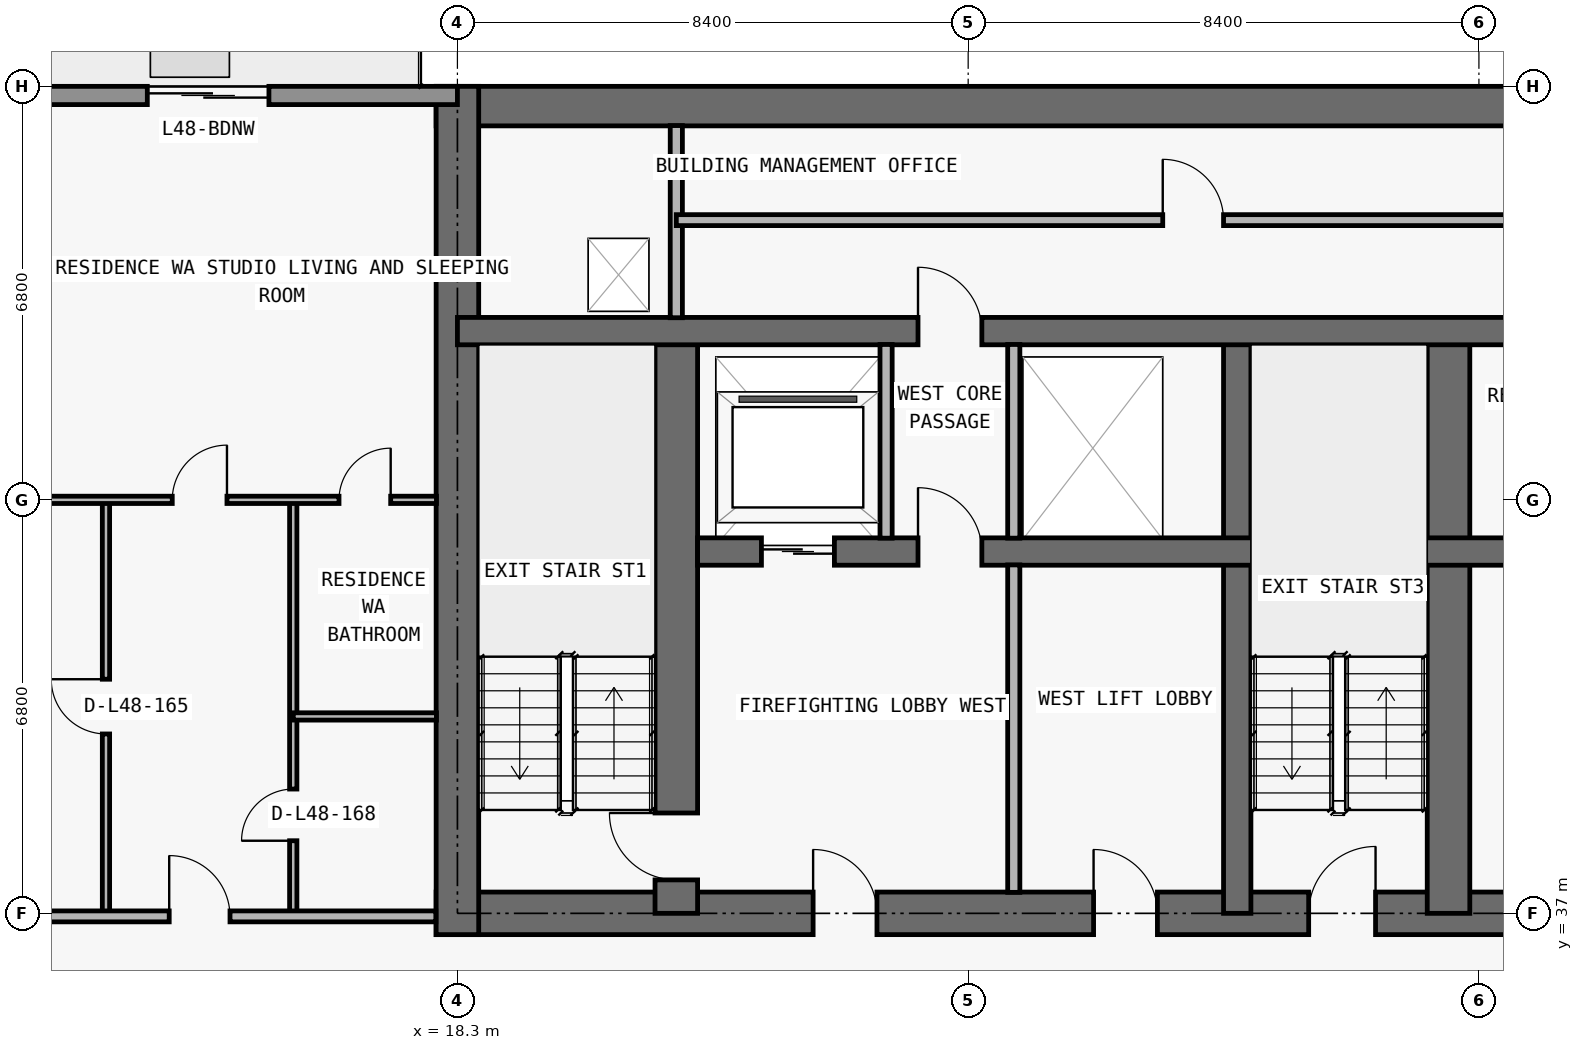
"""IFC4 building model, lengths in metres.
Left out: names, types, materials, properties, quantities, classifications, styles, units other than length and angle.
Written with IfcOpenShell. Run it as: python <this file> out.ifc"""

import sys

from ifc_helpers import new_model, si_unit, direction, frame, frame_2d, origin, place, context, subcontext, project, spatial, rectangle, extrude, element, fill, save


model = new_model("IFC4")
c1 = context("Model", 3, precision=1e-05, world=origin(), true_north=direction((0.0, 1.0)))
c2 = subcontext(c1, "Body", "Model", "MODEL_VIEW")
j1 = project(units=[si_unit("LENGTHUNIT", "METRE"), si_unit("PLANEANGLEUNIT", "RADIAN")], contexts=[c1])
p1 = place(None, origin())
s1 = spatial("IfcSite", under=j1, at=p1, CompositionType="ELEMENT")
p2 = place(p1, origin())
s2 = spatial("IfcBuilding", under=s1, at=p2, CompositionType="ELEMENT")
p3 = place(p2, frame((0.0, 0.0, 173.7)))
s3 = spatial("IfcBuildingStorey", under=s2, at=p3, CompositionType="ELEMENT", Elevation=173.7)
p4 = place(p3, frame((17.95, 37.0, 0.0), z_axis=(0.0, 0.0, 1.0), x_axis=(1.0, 0.0, 0.0)))
e1 = element("IfcWall", 1, at=p4, inside=s3, PredefinedType="SHEAR", context=c2, shape_type="SweptSolid", body=[
    extrude(rectangle(XDim=41.9, YDim=0.7, at=frame_2d((20.95, 0.0))), origin(), (0.0, 0.0, 1.0), 3.05),
])
p5 = place(p4, frame((14.35, 0.0, 0.0)))
e2 = element("IfcOpeningElement", 2, at=p5, cuts=e1, PredefinedType="OPENING", context=c2, shape_type="SweptSolid", body=[
    extrude(rectangle(XDim=1.1, YDim=2.15, at=frame_2d((0.55, 1.075))), frame((0.0, 0.36, 0.0), z_axis=(0.0, -1.0, 0.0), x_axis=(1.0, 0.0, 0.0)), (0.0, 0.0, 1.0), 0.72),
])
p6 = place(p4, frame((6.2, 0.0, 0.0)))
e3 = element("IfcOpeningElement", 3, at=p6, cuts=e1, PredefinedType="OPENING", context=c2, shape_type="SweptSolid", body=[
    extrude(rectangle(XDim=1.05, YDim=2.15, at=frame_2d((0.525, 1.075))), frame((0.0, 0.36, 0.0), z_axis=(0.0, -1.0, 0.0), x_axis=(1.0, 0.0, 0.0)), (0.0, 0.0, 1.0), 0.72),
])
p7 = place(p4, frame((34.7, 0.0, 0.0)))
e4 = element("IfcOpeningElement", 4, at=p7, cuts=e1, PredefinedType="OPENING", context=c2, shape_type="SweptSolid", body=[
    extrude(rectangle(XDim=1.05, YDim=2.15, at=frame_2d((0.525, 1.075))), frame((0.0, 0.36, 0.0), z_axis=(0.0, -1.0, 0.0), x_axis=(1.0, 0.0, 0.0)), (0.0, 0.0, 1.0), 0.72),
])
p8 = place(p4, frame((10.812, 0.0, 0.0)))
e5 = element("IfcOpeningElement", 5, at=p8, cuts=e1, PredefinedType="OPENING", context=c2, shape_type="SweptSolid", body=[
    extrude(rectangle(XDim=1.05, YDim=2.15, at=frame_2d((0.525, 1.075))), frame((0.0, 0.36, 0.0), z_axis=(0.0, -1.0, 0.0), x_axis=(1.0, 0.0, 0.0)), (0.0, 0.0, 1.0), 0.72),
])
p9 = place(p4, frame((24.05, 0.0, 0.0)))
e6 = element("IfcOpeningElement", 6, at=p9, cuts=e1, PredefinedType="OPENING", context=c2, shape_type="SweptSolid", body=[
    extrude(rectangle(XDim=1.05, YDim=2.15, at=frame_2d((0.525, 1.075))), frame((0.0, 0.36, 0.0), z_axis=(0.0, -1.0, 0.0), x_axis=(1.0, 0.0, 0.0)), (0.0, 0.0, 1.0), 0.72),
])
p10 = place(p3, frame((17.95, 50.275, 0.0), z_axis=(0.0, 0.0, 1.0), x_axis=(1.0, 0.0, 0.0)))
e7 = element("IfcWall", 7, at=p10, inside=s3, PredefinedType="SHEAR", context=c2, shape_type="SweptSolid", body=[
    extrude(rectangle(XDim=41.9, YDim=0.65, at=frame_2d((20.95, 0.0))), origin(), (0.0, 0.0, 1.0), 3.05),
])
p11 = place(p3, frame((18.3, 36.65, 0.0), z_axis=(0.0, 0.0, 1.0), x_axis=(0.0, 1.0, 0.0)))
e8 = element("IfcWall", 8, at=p11, inside=s3, PredefinedType="SHEAR", context=c2, shape_type="SweptSolid", body=[
    extrude(rectangle(XDim=13.95, YDim=0.7, at=frame_2d((6.975, 0.0))), origin(), (0.0, 0.0, 1.0), 3.05),
])
p12 = place(p3, frame((21.9, 37.0, 0.0), z_axis=(0.0, 0.0, 1.0), x_axis=(0.0, 1.0, 0.0)))
e9 = element("IfcWall", 9, at=p12, inside=s3, PredefinedType="SHEAR", context=c2, shape_type="SweptSolid", body=[
    extrude(rectangle(XDim=9.575, YDim=0.7, at=frame_2d((4.788, 0.0))), origin(), (0.0, 0.0, 1.0), 3.05),
])
p13 = place(p12, frame((0.55, 0.0, 0.0)))
e10 = element("IfcOpeningElement", 10, at=p13, cuts=e9, PredefinedType="OPENING", context=c2, shape_type="SweptSolid", body=[
    extrude(rectangle(XDim=1.1, YDim=2.15, at=frame_2d((0.55, 1.075))), frame((0.0, 0.36, 0.0), z_axis=(0.0, -1.0, 0.0), x_axis=(1.0, 0.0, 0.0)), (0.0, 0.0, 1.0), 0.72),
])
p14 = place(p3, frame((31.125, 37.0, 0.0), z_axis=(0.0, 0.0, 1.0), x_axis=(0.0, 1.0, 0.0)))
e11 = element("IfcWall", 11, at=p14, inside=s3, PredefinedType="SHEAR", context=c2, shape_type="SweptSolid", body=[
    extrude(rectangle(XDim=9.575, YDim=0.45, at=frame_2d((4.788, 0.0))), origin(), (0.0, 0.0, 1.0), 3.05),
])
p15 = place(p3, frame((34.6, 37.0, 0.0), z_axis=(0.0, 0.0, 1.0), x_axis=(0.0, 1.0, 0.0)))
e12 = element("IfcWall", 12, at=p15, inside=s3, PredefinedType="SHEAR", context=c2, shape_type="SweptSolid", body=[
    extrude(rectangle(XDim=9.575, YDim=0.7, at=frame_2d((4.788, 0.0))), origin(), (0.0, 0.0, 1.0), 3.05),
])
p16 = place(p3, frame((22.25, 42.95, 0.0), z_axis=(0.0, 0.0, 1.0), x_axis=(1.0, 0.0, 0.0)))
e13 = element("IfcWall", 13, at=p16, inside=s3, PredefinedType="SHEAR", context=c2, shape_type="SweptSolid", body=[
    extrude(rectangle(XDim=33.3, YDim=0.45, at=frame_2d((16.65, 0.0))), origin(), (0.0, 0.0, 1.0), 3.05),
])
p17 = place(p16, frame((1.05, 0.0, 0.0)))
e14 = element("IfcOpeningElement", 14, at=p17, cuts=e13, PredefinedType="OPENING", context=c2, shape_type="SweptSolid", body=[
    extrude(rectangle(XDim=1.2, YDim=2.2, at=frame_2d((0.6, 1.1))), frame((0.0, 0.235, 0.0), z_axis=(0.0, -1.0, 0.0), x_axis=(1.0, 0.0, 0.0)), (0.0, 0.0, 1.0), 0.47),
])
p18 = place(p16, frame((31.05, 0.0, 0.0)))
e15 = element("IfcOpeningElement", 15, at=p18, cuts=e13, PredefinedType="OPENING", context=c2, shape_type="SweptSolid", body=[
    extrude(rectangle(XDim=1.2, YDim=2.2, at=frame_2d((0.6, 1.1))), frame((0.0, 0.235, 0.0), z_axis=(0.0, -1.0, 0.0), x_axis=(1.0, 0.0, 0.0)), (0.0, 0.0, 1.0), 0.47),
])
p19 = place(p16, frame((21.4, 0.0, 0.0)))
e16 = element("IfcOpeningElement", 16, at=p19, cuts=e13, PredefinedType="OPENING", context=c2, shape_type="SweptSolid", body=[
    extrude(rectangle(XDim=1.1, YDim=2.2, at=frame_2d((0.55, 1.1))), frame((0.0, 0.235, 0.0), z_axis=(0.0, -1.0, 0.0), x_axis=(1.0, 0.0, 0.0)), (0.0, 0.0, 1.0), 0.47),
])
p20 = place(p16, frame((24.0, 0.0, 0.0)))
e17 = element("IfcOpeningElement", 17, at=p20, cuts=e13, PredefinedType="OPENING", context=c2, shape_type="SweptSolid", body=[
    extrude(rectangle(XDim=1.1, YDim=2.2, at=frame_2d((0.55, 1.1))), frame((0.0, 0.235, 0.0), z_axis=(0.0, -1.0, 0.0), x_axis=(1.0, 0.0, 0.0)), (0.0, 0.0, 1.0), 0.47),
])
p21 = place(p16, frame((3.625, 0.0, 0.0)))
e18 = element("IfcOpeningElement", 18, at=p21, cuts=e13, PredefinedType="OPENING", context=c2, shape_type="SweptSolid", body=[
    extrude(rectangle(XDim=1.05, YDim=2.15, at=frame_2d((0.525, 1.075))), frame((0.0, 0.235, 0.0), z_axis=(0.0, -1.0, 0.0), x_axis=(1.0, 0.0, 0.0)), (0.0, 0.0, 1.0), 0.47),
])
p22 = place(p16, frame((28.675, 0.0, 0.0)))
e19 = element("IfcOpeningElement", 19, at=p22, cuts=e13, PredefinedType="OPENING", context=c2, shape_type="SweptSolid", body=[
    extrude(rectangle(XDim=1.05, YDim=2.15, at=frame_2d((0.525, 1.075))), frame((0.0, 0.235, 0.0), z_axis=(0.0, -1.0, 0.0), x_axis=(1.0, 0.0, 0.0)), (0.0, 0.0, 1.0), 0.47),
])
p23 = place(p16, frame((13.925, 0.0, 0.0)))
e20 = element("IfcOpeningElement", 20, at=p23, cuts=e13, PredefinedType="OPENING", context=c2, shape_type="SweptSolid", body=[
    extrude(rectangle(XDim=1.0, YDim=2.2, at=frame_2d((0.5, 1.1))), frame((0.0, 0.235, 0.0), z_axis=(0.0, -1.0, 0.0), x_axis=(1.0, 0.0, 0.0)), (0.0, 0.0, 1.0), 0.47),
])
p24 = place(p16, frame((18.05, 0.0, 0.0)))
e21 = element("IfcOpeningElement", 21, at=p24, cuts=e13, PredefinedType="OPENING", context=c2, shape_type="SweptSolid", body=[
    extrude(rectangle(XDim=1.0, YDim=2.2, at=frame_2d((0.5, 1.1))), frame((0.0, 0.235, 0.0), z_axis=(0.0, -1.0, 0.0), x_axis=(1.0, 0.0, 0.0)), (0.0, 0.0, 1.0), 0.47),
])
p25 = place(p3, frame((18.3, 46.575, 0.0), z_axis=(0.0, 0.0, 1.0), x_axis=(1.0, 0.0, 0.0)))
e22 = element("IfcWall", 22, at=p25, inside=s3, PredefinedType="SHEAR", context=c2, shape_type="SweptSolid", body=[
    extrude(rectangle(XDim=41.2, YDim=0.45, at=frame_2d((20.6, 0.0))), origin(), (0.0, 0.0, 1.0), 3.05),
])
p26 = place(p25, frame((7.575, 0.0, 0.0)))
e23 = element("IfcOpeningElement", 23, at=p26, cuts=e22, PredefinedType="OPENING", context=c2, shape_type="SweptSolid", body=[
    extrude(rectangle(XDim=1.05, YDim=2.15, at=frame_2d((0.525, 1.075))), frame((0.0, 0.235, 0.0), z_axis=(0.0, -1.0, 0.0), x_axis=(1.0, 0.0, 0.0)), (0.0, 0.0, 1.0), 0.47),
])
p27 = place(p25, frame((32.625, 0.0, 0.0)))
e24 = element("IfcOpeningElement", 24, at=p27, cuts=e22, PredefinedType="OPENING", context=c2, shape_type="SweptSolid", body=[
    extrude(rectangle(XDim=1.05, YDim=2.15, at=frame_2d((0.525, 1.075))), frame((0.0, 0.235, 0.0), z_axis=(0.0, -1.0, 0.0), x_axis=(1.0, 0.0, 0.0)), (0.0, 0.0, 1.0), 0.47),
])
p28 = place(p3, frame((10.1, 50.45, 0.0), z_axis=(0.0, 0.0, 1.0), x_axis=(1.0, 0.0, 0.0)))
e25 = element("IfcWall", 25, at=p28, inside=s3, PredefinedType="STANDARD", context=c2, shape_type="SweptSolid", body=[
    extrude(rectangle(XDim=8.2, YDim=0.3, at=frame_2d((4.1, 0.0))), origin(), (0.0, 0.0, 1.0), 3.05),
])
p29 = place(p28, frame((3.1, 0.0, 0.0)))
e26 = element("IfcOpeningElement", 26, at=p29, cuts=e25, PredefinedType="OPENING", context=c2, shape_type="SweptSolid", body=[
    extrude(rectangle(XDim=2.0, YDim=2.3, at=frame_2d((1.0, 1.15))), frame((0.0, 0.16, 0.0), z_axis=(0.0, -1.0, 0.0), x_axis=(1.0, 0.0, 0.0)), (0.0, 0.0, 1.0), 0.32),
])
p30 = place(p3, frame((12.52, 37.0, 0.0), z_axis=(0.0, 0.0, 1.0), x_axis=(0.0, 1.0, 0.0)))
e27 = element("IfcWall", 27, at=p30, inside=s3, PredefinedType="PARTITIONING", context=c2, shape_type="SweptSolid", body=[
    extrude(rectangle(XDim=6.8, YDim=0.12, at=frame_2d((3.4, 0.0))), origin(), (0.0, 0.0, 1.0), 2.578),
])
p31 = place(p30, frame((2.95, 0.0, 0.0)))
e28 = element("IfcOpeningElement", 28, at=p31, cuts=e27, PredefinedType="OPENING", context=c2, shape_type="SweptSolid", body=[
    extrude(rectangle(XDim=0.9, YDim=2.15, at=frame_2d((0.45, 1.075))), frame((0.0, 0.07, 0.0), z_axis=(0.0, -1.0, 0.0), x_axis=(1.0, 0.0, 0.0)), (0.0, 0.0, 1.0), 0.14),
])
p32 = place(p3, frame((15.6, 37.0, 0.0), z_axis=(0.0, 0.0, 1.0), x_axis=(0.0, 1.0, 0.0)))
e29 = element("IfcWall", 29, at=p32, inside=s3, PredefinedType="PARTITIONING", context=c2, shape_type="SweptSolid", body=[
    extrude(rectangle(XDim=6.8, YDim=0.12, at=frame_2d((3.4, 0.0))), origin(), (0.0, 0.0, 1.0), 2.679),
])
p33 = place(p32, frame((1.194, 0.0, 0.0)))
e30 = element("IfcOpeningElement", 30, at=p33, cuts=e29, PredefinedType="OPENING", context=c2, shape_type="SweptSolid", body=[
    extrude(rectangle(XDim=0.85, YDim=2.1, at=frame_2d((0.425, 1.05))), frame((0.0, 0.07, 0.0), z_axis=(0.0, -1.0, 0.0), x_axis=(1.0, 0.0, 0.0)), (0.0, 0.0, 1.0), 0.14),
])
p34 = place(p3, frame((21.9, 46.795, 0.0), z_axis=(0.0, 0.0, 1.0), x_axis=(0.0, 1.0, 0.0)))
e31 = element("IfcWall", 31, at=p34, inside=s3, PredefinedType="PARTITIONING", context=c2, shape_type="SweptSolid", body=[
    extrude(rectangle(XDim=3.16, YDim=0.2, at=frame_2d((1.58, 0.0))), origin(), (0.0, 0.0, 1.0), 3.05),
])
p35 = place(p3, frame((25.35, 43.17, 0.0), z_axis=(0.0, 0.0, 1.0), x_axis=(0.0, 1.0, 0.0)))
e32 = element("IfcWall", 32, at=p35, inside=s3, PredefinedType="PARTITIONING", context=c2, shape_type="SweptSolid", body=[
    extrude(rectangle(XDim=3.185, YDim=0.2, at=frame_2d((1.593, 0.0))), origin(), (0.0, 0.0, 1.0), 3.05),
])
p36 = place(p3, frame((27.45, 37.345, 0.0), z_axis=(0.0, 0.0, 1.0), x_axis=(0.0, 1.0, 0.0)))
e33 = element("IfcWall", 33, at=p36, inside=s3, PredefinedType="PARTITIONING", context=c2, shape_type="SweptSolid", body=[
    extrude(rectangle(XDim=5.385, YDim=0.2, at=frame_2d((2.692, 0.0))), origin(), (0.0, 0.0, 1.0), 3.05),
])
p37 = place(p3, frame((27.45, 43.17, 0.0), z_axis=(0.0, 0.0, 1.0), x_axis=(0.0, 1.0, 0.0)))
e34 = element("IfcWall", 34, at=p37, inside=s3, PredefinedType="PARTITIONING", context=c2, shape_type="SweptSolid", body=[
    extrude(rectangle(XDim=3.185, YDim=0.2, at=frame_2d((1.593, 0.0))), origin(), (0.0, 0.0, 1.0), 3.05),
])
p38 = place(p3, frame((10.1, 36.95, 0.0), z_axis=(0.0, 0.0, 1.0), x_axis=(1.0, 0.0, 0.0)))
e35 = element("IfcWall", 35, at=p38, inside=s3, PredefinedType="PARTITIONING", context=c2, shape_type="SweptSolid", body=[
    extrude(rectangle(XDim=7.845, YDim=0.18, at=frame_2d((3.922, 0.0))), origin(), (0.0, 0.0, 1.0), 3.05),
])
p39 = place(p38, frame((3.46, 0.0, 0.0)))
e36 = element("IfcOpeningElement", 36, at=p39, cuts=e35, PredefinedType="OPENING", context=c2, shape_type="SweptSolid", body=[
    extrude(rectangle(XDim=1.0, YDim=2.2, at=frame_2d((0.5, 1.1))), frame((0.0, 0.1, 0.0), z_axis=(0.0, -1.0, 0.0), x_axis=(1.0, 0.0, 0.0)), (0.0, 0.0, 1.0), 0.2),
])
p40 = place(p3, frame((15.6, 40.238, 0.0), z_axis=(0.0, 0.0, 1.0), x_axis=(1.0, 0.0, 0.0)))
e37 = element("IfcWall", 37, at=p40, inside=s3, PredefinedType="PARTITIONING", context=c2, shape_type="SweptSolid", body=[
    extrude(rectangle(XDim=2.355, YDim=0.12, at=frame_2d((1.177, 0.0))), origin(), (0.0, 0.0, 1.0), 3.05),
])
p41 = place(p3, frame((6.395, 43.8, 0.0), z_axis=(0.0, 0.0, 1.0), x_axis=(1.0, 0.0, 0.0)))
e38 = element("IfcWall", 38, at=p41, inside=s3, PredefinedType="PARTITIONING", context=c2, shape_type="SweptSolid", body=[
    extrude(rectangle(XDim=11.56, YDim=0.12, at=frame_2d((5.78, 0.0))), origin(), (0.0, 0.0, 1.0), 2.418),
])
p42 = place(p41, frame((7.215, 0.0, 0.0)))
e39 = element("IfcOpeningElement", 39, at=p42, cuts=e38, PredefinedType="OPENING", context=c2, shape_type="SweptSolid", body=[
    extrude(rectangle(XDim=0.9, YDim=2.15, at=frame_2d((0.45, 1.075))), frame((0.0, 0.07, 0.0), z_axis=(0.0, -1.0, 0.0), x_axis=(1.0, 0.0, 0.0)), (0.0, 0.0, 1.0), 0.14),
])
p43 = place(p41, frame((9.958, 0.0, 0.0)))
e40 = element("IfcOpeningElement", 40, at=p43, cuts=e38, PredefinedType="OPENING", context=c2, shape_type="SweptSolid", body=[
    extrude(rectangle(XDim=0.85, YDim=2.1, at=frame_2d((0.425, 1.05))), frame((0.0, 0.07, 0.0), z_axis=(0.0, -1.0, 0.0), x_axis=(1.0, 0.0, 0.0)), (0.0, 0.0, 1.0), 0.14),
])
p44 = place(p3, frame((21.9, 48.4, 0.0), z_axis=(0.0, 0.0, 1.0), x_axis=(1.0, 0.0, 0.0)))
e41 = element("IfcWall", 41, at=p44, inside=s3, PredefinedType="PARTITIONING", context=c2, shape_type="SweptSolid", body=[
    extrude(rectangle(XDim=34.0, YDim=0.18, at=frame_2d((17.0, 0.0))), origin(), (0.0, 0.0, 1.0), 3.05),
])
p45 = place(p44, frame((8.0, 0.0, 0.0)))
e42 = element("IfcOpeningElement", 42, at=p45, cuts=e41, PredefinedType="OPENING", context=c2, shape_type="SweptSolid", body=[
    extrude(rectangle(XDim=1.0, YDim=2.2, at=frame_2d((0.5, 1.1))), frame((0.0, 0.1, 0.0), z_axis=(0.0, -1.0, 0.0), x_axis=(1.0, 0.0, 0.0)), (0.0, 0.0, 1.0), 0.2),
])
p46 = place(p44, frame((25.0, 0.0, 0.0)))
e43 = element("IfcOpeningElement", 43, at=p46, cuts=e41, PredefinedType="OPENING", context=c2, shape_type="SweptSolid", body=[
    extrude(rectangle(XDim=1.0, YDim=2.2, at=frame_2d((0.5, 1.1))), frame((0.0, 0.1, 0.0), z_axis=(0.0, -1.0, 0.0), x_axis=(1.0, 0.0, 0.0)), (0.0, 0.0, 1.0), 0.2),
])
p47 = place(p29, origin())
e44 = element("IfcDoor", 44, at=p47, inside=s3, OperationType="DOUBLE_DOOR_SLIDING", PredefinedType="DOOR", context=c2, shape_type="SweptSolid", body=[
    extrude(rectangle(XDim=2.0, YDim=2.3, at=frame_2d((1.0, 1.15))), frame((0.0, 0.025, 0.0), z_axis=(0.0, -1.0, 0.0), x_axis=(1.0, 0.0, 0.0)), (0.0, 0.0, 1.0), 0.05),
])
fill(e26, e44)
p48 = place(p17, origin())
e45 = element("IfcDoor", 45, at=p48, inside=s3, OperationType="DOUBLE_DOOR_SLIDING", PredefinedType="DOOR", context=c2, shape_type="SweptSolid", body=[
    extrude(rectangle(XDim=1.2, YDim=2.2, at=frame_2d((0.6, 1.1))), frame((0.0, 0.025, 0.0), z_axis=(0.0, -1.0, 0.0), x_axis=(1.0, 0.0, 0.0)), (0.0, 0.0, 1.0), 0.05),
])
fill(e14, e45)
p49 = place(p5, origin())
e46 = element("IfcDoor", 46, at=p49, inside=s3, OperationType="SINGLE_SWING_RIGHT", PredefinedType="DOOR", context=c2, shape_type="SweptSolid", body=[
    extrude(rectangle(XDim=1.1, YDim=2.15, at=frame_2d((0.55, 1.075))), frame((0.0, 0.025, 0.0), z_axis=(0.0, -1.0, 0.0), x_axis=(1.0, 0.0, 0.0)), (0.0, 0.0, 1.0), 0.05),
])
fill(e2, e46)
p50 = place(p6, origin())
e47 = element("IfcDoor", 47, at=p50, inside=s3, OperationType="SINGLE_SWING_LEFT", PredefinedType="DOOR", context=c2, shape_type="SweptSolid", body=[
    extrude(rectangle(XDim=1.05, YDim=2.15, at=frame_2d((0.525, 1.075))), frame((0.0, 0.025, 0.0), z_axis=(0.0, -1.0, 0.0), x_axis=(1.0, 0.0, 0.0)), (0.0, 0.0, 1.0), 0.05),
])
fill(e3, e47)
p51 = place(p13, origin())
e48 = element("IfcDoor", 48, at=p51, inside=s3, OperationType="SINGLE_SWING_RIGHT", PredefinedType="DOOR", context=c2, shape_type="SweptSolid", body=[
    extrude(rectangle(XDim=1.1, YDim=2.15, at=frame_2d((0.55, 1.075))), frame((0.0, 0.025, 0.0), z_axis=(0.0, -1.0, 0.0), x_axis=(1.0, 0.0, 0.0)), (0.0, 0.0, 1.0), 0.05),
])
fill(e10, e48)
p52 = place(p21, origin())
e49 = element("IfcDoor", 49, at=p52, inside=s3, OperationType="SINGLE_SWING_LEFT", PredefinedType="DOOR", context=c2, shape_type="SweptSolid", body=[
    extrude(rectangle(XDim=1.05, YDim=2.15, at=frame_2d((0.525, 1.075))), frame((0.0, 0.025, 0.0), z_axis=(0.0, -1.0, 0.0), x_axis=(1.0, 0.0, 0.0)), (0.0, 0.0, 1.0), 0.05),
])
fill(e18, e49)
p53 = place(p8, origin())
e50 = element("IfcDoor", 50, at=p53, inside=s3, OperationType="SINGLE_SWING_LEFT", PredefinedType="DOOR", context=c2, shape_type="SweptSolid", body=[
    extrude(rectangle(XDim=1.05, YDim=2.15, at=frame_2d((0.525, 1.075))), frame((0.0, 0.025, 0.0), z_axis=(0.0, -1.0, 0.0), x_axis=(1.0, 0.0, 0.0)), (0.0, 0.0, 1.0), 0.05),
])
fill(e5, e50)
p54 = place(p26, origin())
e51 = element("IfcDoor", 51, at=p54, inside=s3, OperationType="SINGLE_SWING_LEFT", PredefinedType="DOOR", context=c2, shape_type="SweptSolid", body=[
    extrude(rectangle(XDim=1.05, YDim=2.15, at=frame_2d((0.525, 1.075))), frame((0.0, 0.025, 0.0), z_axis=(0.0, -1.0, 0.0), x_axis=(1.0, 0.0, 0.0)), (0.0, 0.0, 1.0), 0.05),
])
fill(e23, e51)
p55 = place(p45, origin())
e52 = element("IfcDoor", 52, at=p55, inside=s3, OperationType="SINGLE_SWING_LEFT", PredefinedType="DOOR", context=c2, shape_type="SweptSolid", body=[
    extrude(rectangle(XDim=1.0, YDim=2.2, at=frame_2d((0.5, 1.1))), frame((0.0, 0.025, 0.0), z_axis=(0.0, -1.0, 0.0), x_axis=(1.0, 0.0, 0.0)), (0.0, 0.0, 1.0), 0.05),
])
fill(e42, e52)
p56 = place(p31, origin())
e53 = element("IfcDoor", 53, at=p56, inside=s3, OperationType="SINGLE_SWING_RIGHT", PredefinedType="DOOR", context=c2, shape_type="SweptSolid", body=[
    extrude(rectangle(XDim=0.9, YDim=2.15, at=frame_2d((0.45, 1.075))), frame((0.0, 0.025, 0.0), z_axis=(0.0, -1.0, 0.0), x_axis=(1.0, 0.0, 0.0)), (0.0, 0.0, 1.0), 0.05),
])
fill(e28, e53)
p57 = place(p39, origin())
e54 = element("IfcDoor", 54, at=p57, inside=s3, OperationType="SINGLE_SWING_LEFT", PredefinedType="DOOR", context=c2, shape_type="SweptSolid", body=[
    extrude(rectangle(XDim=1.0, YDim=2.2, at=frame_2d((0.5, 1.1))), frame((0.0, 0.025, 0.0), z_axis=(0.0, -1.0, 0.0), x_axis=(1.0, 0.0, 0.0)), (0.0, 0.0, 1.0), 0.05),
])
fill(e36, e54)
p58 = place(p42, origin())
e55 = element("IfcDoor", 55, at=p58, inside=s3, OperationType="SINGLE_SWING_RIGHT", PredefinedType="DOOR", context=c2, shape_type="SweptSolid", body=[
    extrude(rectangle(XDim=0.9, YDim=2.15, at=frame_2d((0.45, 1.075))), frame((0.0, 0.025, 0.0), z_axis=(0.0, -1.0, 0.0), x_axis=(1.0, 0.0, 0.0)), (0.0, 0.0, 1.0), 0.05),
])
fill(e39, e55)
p59 = place(p33, origin())
e56 = element("IfcDoor", 56, at=p59, inside=s3, OperationType="SINGLE_SWING_LEFT", PredefinedType="DOOR", context=c2, shape_type="SweptSolid", body=[
    extrude(rectangle(XDim=0.85, YDim=2.1, at=frame_2d((0.425, 1.05))), frame((0.0, 0.025, 0.0), z_axis=(0.0, -1.0, 0.0), x_axis=(1.0, 0.0, 0.0)), (0.0, 0.0, 1.0), 0.05),
])
fill(e30, e56)
p60 = place(p43, origin())
e57 = element("IfcDoor", 57, at=p60, inside=s3, OperationType="SINGLE_SWING_RIGHT", PredefinedType="DOOR", context=c2, shape_type="SweptSolid", body=[
    extrude(rectangle(XDim=0.85, YDim=2.1, at=frame_2d((0.425, 1.05))), frame((0.0, 0.025, 0.0), z_axis=(0.0, -1.0, 0.0), x_axis=(1.0, 0.0, 0.0)), (0.0, 0.0, 1.0), 0.05),
])
fill(e40, e57)
save(model, sys.argv[1])
